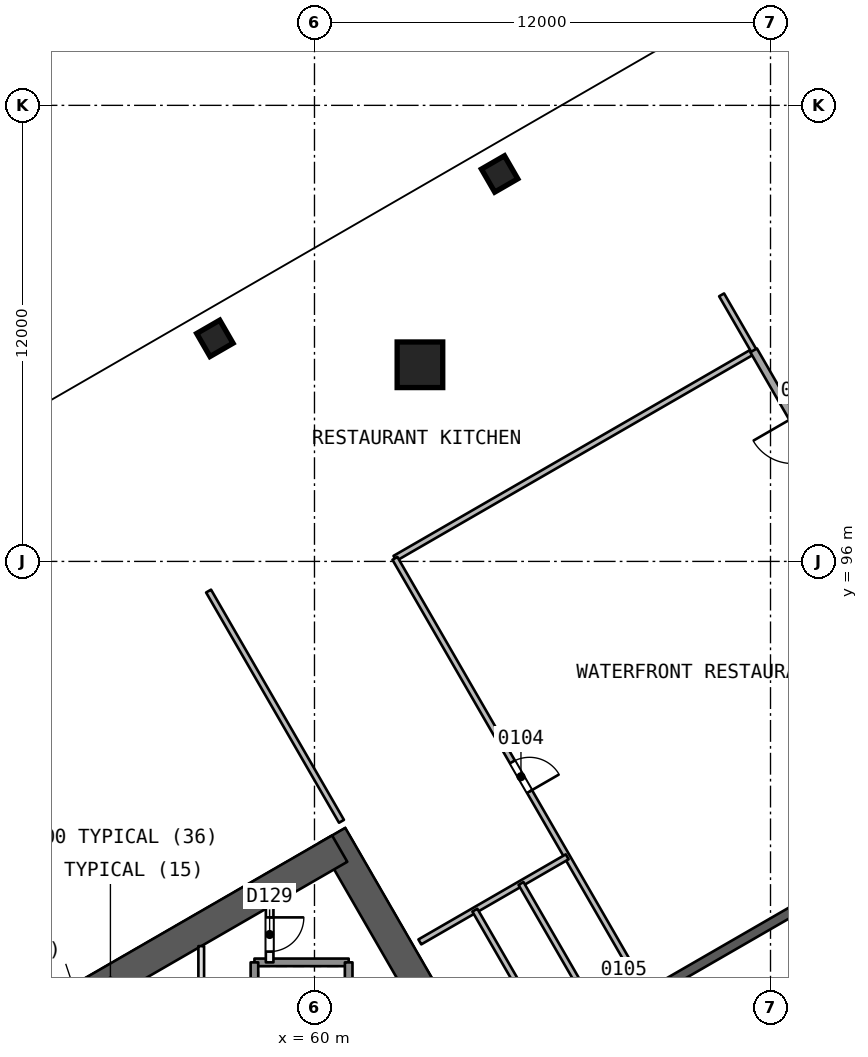
"""IFC4 building model, lengths in metres.
Left out: names, types, materials, properties, quantities, classifications, styles, units other than length and angle.
Written with IfcOpenShell. Run it as: python <this file> out.ifc"""

import sys

from ifc_helpers import new_model, si_unit, direction, frame, frame_2d, origin, origin_2d, place, context, subcontext, project, spatial, rectangle, extrude, element, fill, save


model = new_model("IFC4")
c1 = context("Model", 3, precision=1e-05, world=origin(), true_north=direction((0.0, 1.0)))
c2 = subcontext(c1, "Body", "Model", "MODEL_VIEW")
j1 = project(units=[si_unit("LENGTHUNIT", "METRE"), si_unit("PLANEANGLEUNIT", "RADIAN")], contexts=[c1])
p1 = place(None, origin())
s1 = spatial("IfcSite", under=j1, at=p1, CompositionType="ELEMENT")
p2 = place(p1, origin())
s2 = spatial("IfcBuilding", under=s1, at=p2, CompositionType="ELEMENT")
p3 = place(p2, frame((0.0, 0.0, 9.0)))
s3 = spatial("IfcBuildingStorey", under=s2, at=p3, CompositionType="ELEMENT", Elevation=9.0)
p4 = place(p3, frame((65.538, 80.0, 0.0), z_axis=(0.0, 0.0, 1.0), x_axis=(-0.49999662545, 0.866027352073, 0.0)))
e1 = element("IfcWall", 1, at=p4, inside=s3, PredefinedType="SHEAR", context=c2, shape_type="SweptSolid", body=[
    extrude(rectangle(XDim=10.149, YDim=0.8, at=frame_2d((5.074, 0.0))), origin(), (0.0, 0.0, 1.0), 6.0),
])
p5 = place(p4, frame((0.719, 0.0, 0.0)))
e2 = element("IfcOpeningElement", 2, at=p5, cuts=e1, PredefinedType="OPENING", context=c2, shape_type="SweptSolid", body=[
    extrude(rectangle(XDim=1.2, YDim=2.1, at=frame_2d((0.6, 1.05))), frame((0.0, 0.411, 0.0), z_axis=(0.0, -1.0, 0.0), x_axis=(1.0, 0.0, 0.0)), (0.0, 0.0, 1.0), 0.821),
])
p6 = place(p3, frame((60.664, 88.443, 0.0), z_axis=(0.0, 0.0, 1.0), x_axis=(-0.866029478545, -0.499992942241, 0.0)))
e3 = element("IfcWall", 3, at=p6, inside=s3, PredefinedType="SHEAR", context=c2, shape_type="SweptSolid", body=[
    extrude(rectangle(XDim=13.933, YDim=0.8, at=frame_2d((6.967, 0.0))), origin(), (0.0, 0.0, 1.0), 6.0),
])
p7 = place(p3, frame((78.2, 90.046, 0.0), z_axis=(0.0, 0.0, 1.0), x_axis=(-0.866026492143, -0.499998114903, 0.0)))
e4 = element("IfcWall", 4, at=p7, inside=s3, PredefinedType="SHEAR", context=c2, shape_type="SweptSolid", body=[
    extrude(rectangle(XDim=15.588, YDim=0.25, at=frame_2d((7.794, 0.0))), origin(), (0.0, 0.0, 1.0), 5.6),
])
p8 = place(p7, frame((4.856, 0.0, 0.0)))
e5 = element("IfcOpeningElement", 5, at=p8, cuts=e4, PredefinedType="OPENING", context=c2, shape_type="SweptSolid", body=[
    extrude(rectangle(XDim=1.2, YDim=2.4, at=frame_2d((0.6, 1.2))), frame((0.0, 0.135, 0.0), z_axis=(0.0, -1.0, 0.0), x_axis=(1.0, 0.0, 0.0)), (0.0, 0.0, 1.0), 0.271),
])
p9 = place(p7, frame((11.163, 0.0, 0.0)))
e6 = element("IfcOpeningElement", 6, at=p9, cuts=e4, PredefinedType="OPENING", context=c2, shape_type="SweptSolid", body=[
    extrude(rectangle(XDim=0.9, YDim=2.1, at=frame_2d((0.45, 1.05))), frame((0.0, 0.135, 0.0), z_axis=(0.0, -1.0, 0.0), x_axis=(1.0, 0.0, 0.0)), (0.0, 0.0, 1.0), 0.271),
])
p10 = place(p7, frame((12.566, 0.0, 0.0)))
e7 = element("IfcOpeningElement", 7, at=p10, cuts=e4, PredefinedType="OPENING", context=c2, shape_type="SweptSolid", body=[
    extrude(rectangle(XDim=0.9, YDim=2.1, at=frame_2d((0.45, 1.05))), frame((0.0, 0.135, 0.0), z_axis=(0.0, -1.0, 0.0), x_axis=(1.0, 0.0, 0.0)), (0.0, 0.0, 1.0), 0.271),
])
p11 = place(p7, frame((14.203, 0.0, 0.0)))
e8 = element("IfcOpeningElement", 8, at=p11, cuts=e4, PredefinedType="OPENING", context=c2, shape_type="SweptSolid", body=[
    extrude(rectangle(XDim=0.9, YDim=2.1, at=frame_2d((0.45, 1.05))), frame((0.0, 0.135, 0.0), z_axis=(0.0, -1.0, 0.0), x_axis=(1.0, 0.0, 0.0)), (0.0, 0.0, 1.0), 0.271),
])
p12 = place(p3, frame((62.763, 101.195, 0.0), z_axis=(0.010089088034, -0.017493176833, 0.999796078742), x_axis=(-0.499503863696, 0.866076260626, 0.020194081635)))
e9 = element("IfcColumn", 9, at=p12, inside=s3, PredefinedType="COLUMN", context=c2, shape_type="SweptSolid", body=[
    extrude(rectangle(XDim=1.2, YDim=1.2, at=origin_2d()), origin(), (0.0, 0.0, 1.0), 6.001),
])
for number, where, z_axis, x_axis in (
    (10, (64.871, 106.195, 0.0), (0.0, 0.0, 1.0), (0.866, 0.5, 0.0)),
    (11, (57.379, 101.869, 0.0), (0.0, 0.0, 1.0), (0.866, 0.5, 0.0)),
):
    element("IfcColumn", number, at=place(p3, frame(where, z_axis=z_axis, x_axis=x_axis)), inside=s3, PredefinedType="COLUMN", context=c2, shape_type="SweptSolid", body=[
        extrude(rectangle(XDim=0.7, YDim=0.7, at=origin_2d()), origin(), (0.0, 0.0, 1.0), 6.0),
    ])
p13 = place(p3, frame((71.566, 101.536, 0.0), z_axis=(0.0, 0.0, 1.0), x_axis=(-0.866017530991, -0.50001363583, 0.0)))
e12 = element("IfcWall", 12, at=p13, inside=s3, PredefinedType="PARTITIONING", context=c2, shape_type="SweptSolid", body=[
    extrude(rectangle(XDim=10.911, YDim=0.15, at=frame_2d((5.456, 0.0))), origin(), (0.0, 0.0, 1.0), 5.6),
])
p14 = place(p3, frame((62.117, 96.081, 0.0), z_axis=(0.0, 0.0, 1.0), x_axis=(0.49992899291, -0.866066395866, 0.0)))
e13 = element("IfcWall", 13, at=p14, inside=s3, PredefinedType="PARTITIONING", context=c2, shape_type="SweptSolid", body=[
    extrude(rectangle(XDim=13.268, YDim=0.15, at=frame_2d((6.634, 0.0))), origin(), (0.0, 0.0, 1.0), 5.6),
])
p15 = place(p14, frame((6.184, 0.0, 0.0)))
e14 = element("IfcOpeningElement", 14, at=p15, cuts=e13, PredefinedType="OPENING", context=c2, shape_type="SweptSolid", body=[
    extrude(rectangle(XDim=0.9, YDim=2.1, at=frame_2d((0.45, 1.05))), frame((0.0, 0.085, 0.0), z_axis=(0.0, -1.0, 0.0), x_axis=(1.0, 0.0, 0.0)), (0.0, 0.0, 1.0), 0.171),
])
p16 = place(p3, frame((74.21, 96.956, 0.0), z_axis=(0.0, 0.0, 1.0), x_axis=(-0.499991804824, 0.86603013522, 0.0)))
e15 = element("IfcWall", 15, at=p16, inside=s3, PredefinedType="PARTITIONING", context=c2, shape_type="SweptSolid", body=[
    extrude(rectangle(XDim=5.309, YDim=0.2, at=frame_2d((2.655, 0.0))), origin(), (0.0, 0.0, 1.0), 5.6),
])
p17 = place(p16, frame((2.055, 0.0, 0.0)))
e16 = element("IfcOpeningElement", 16, at=p17, cuts=e15, PredefinedType="OPENING", context=c2, shape_type="SweptSolid", body=[
    extrude(rectangle(XDim=1.2, YDim=2.4, at=frame_2d((0.6, 1.2))), frame((0.0, 0.11, 0.0), z_axis=(0.0, -1.0, 0.0), x_axis=(1.0, 0.0, 0.0)), (0.0, 0.0, 1.0), 0.221),
])
p18 = place(p3, frame((62.772, 85.989, 0.0), z_axis=(0.0, 0.0, 1.0), x_axis=(0.866013054227, 0.500021389451, 0.0)))
e17 = element("IfcWall", 17, at=p18, inside=s3, PredefinedType="PARTITIONING", context=c2, shape_type="SweptSolid", body=[
    extrude(rectangle(XDim=4.477, YDim=0.15, at=frame_2d((2.239, 0.0))), origin(), (0.0, 0.0, 1.0), 5.6),
])
p19 = place(p3, frame((57.213, 95.219, 0.0), z_axis=(0.0, 0.0, 1.0), x_axis=(0.499979261727, -0.866037376701, 0.0)))
e18 = element("IfcWall", 18, at=p19, inside=s3, PredefinedType="PARTITIONING", context=c2, shape_type="SweptSolid", body=[
    extrude(rectangle(XDim=6.995, YDim=0.15, at=frame_2d((3.498, 0.0))), origin(), (0.0, 0.0, 1.0), 5.6),
])
p20 = place(p3, frame((71.576, 101.519, 0.0), z_axis=(0.0, 0.0, 1.0), x_axis=(-0.499942880228, 0.866058379388, 0.0)))
e19 = element("IfcWall", 19, at=p20, inside=s3, PredefinedType="PARTITIONING", context=c2, shape_type="SweptSolid", body=[
    extrude(rectangle(XDim=1.726, YDim=0.15, at=frame_2d((0.863, 0.0))), origin(), (0.0, 0.0, 1.0), 5.6),
])
for number, where, z_axis, x_axis in (
    (20, (65.435, 87.526, 0.0), (0.0, 0.0, 1.0), (0.5, -0.866, 0.0)),
    (21, (64.22, 86.824, 0.0), (0.0, 0.0, 1.0), (0.5, -0.866, 0.0)),
):
    element("IfcWall", number, at=place(p3, frame(where, z_axis=z_axis, x_axis=x_axis)), inside=s3, PredefinedType="PARTITIONING", context=c2, shape_type="SweptSolid", body=[
        extrude(rectangle(XDim=4.2, YDim=0.15, at=frame_2d((2.1, 0.0))), origin(), (0.0, 0.0, 1.0), 5.6),
    ])
p21 = place(p3, frame((60.9, 85.45, 0.0), z_axis=(0.0, 0.0, 1.0), x_axis=(-1.0, 0.0, 0.0)))
e22 = element("IfcWall", 22, at=p21, inside=s3, PredefinedType="SOLIDWALL", context=c2, shape_type="SweptSolid", body=[
    extrude(rectangle(XDim=2.48, YDim=0.2, at=frame_2d((1.24, 0.0))), origin(), (0.0, 0.0, 1.0), 5.6),
])
p22 = place(p3, frame((60.9, 85.45, 0.0), z_axis=(0.0, 0.0, 1.0), x_axis=(0.0, -1.0, 0.0)))
e23 = element("IfcWall", 23, at=p22, inside=s3, PredefinedType="SOLIDWALL", context=c2, shape_type="SweptSolid", body=[
    extrude(rectangle(XDim=10.9, YDim=0.2, at=frame_2d((5.45, 0.0))), origin(), (0.0, 0.0, 1.0), 5.6),
])
p23 = place(p3, frame((58.82, 86.917, 0.0), z_axis=(0.0, 0.0, 1.0), x_axis=(0.0, -1.0, 0.0)))
e24 = element("IfcWall", 24, at=p23, inside=s3, PredefinedType="PARTITIONING", context=c2, shape_type="SweptSolid", body=[
    extrude(rectangle(XDim=1.467, YDim=0.2, at=frame_2d((0.733, 0.0))), origin(), (0.0, 0.0, 1.0), 5.6),
])
p24 = place(p23, frame((0.283, 0.0, 0.0)))
e25 = element("IfcOpeningElement", 25, at=p24, cuts=e24, PredefinedType="OPENING", context=c2, shape_type="SweptSolid", body=[
    extrude(rectangle(XDim=0.9, YDim=2.1, at=frame_2d((0.45, 1.05))), frame((0.0, 0.11, 0.0), z_axis=(0.0, -1.0, 0.0), x_axis=(1.0, 0.0, 0.0)), (0.0, 0.0, 1.0), 0.221),
])
p25 = place(p3, frame((58.42, 85.45, 0.0), z_axis=(0.0, 0.0, 1.0), x_axis=(0.0, -1.0, 0.0)))
e26 = element("IfcWall", 26, at=p25, inside=s3, PredefinedType="SOLIDWALL", context=c2, shape_type="SweptSolid", body=[
    extrude(rectangle(XDim=9.0, YDim=0.2, at=frame_2d((4.5, 0.0))), origin(), (0.0, 0.0, 1.0), 5.6),
])
p26 = place(p3, frame((57.02, 85.877, 0.0), z_axis=(0.0, 0.0, 1.0), x_axis=(0.0, -1.0, 0.0)))
e27 = element("IfcWall", 27, at=p26, inside=s3, PredefinedType="PARTITIONING", context=c2, shape_type="SweptSolid", body=[
    extrude(rectangle(XDim=2.377, YDim=0.15, at=frame_2d((1.189, 0.0))), origin(), (0.0, 0.0, 1.0), 5.6),
])
p27 = place(p3, frame((77.738, 86.846, 0.0), z_axis=(0.0, 0.0, 1.0), x_axis=(-0.866026658274, -0.499997827154, 0.0)))
e28 = element("IfcWall", 28, at=p27, inside=s3, PredefinedType="PARTITIONING", context=c2, shape_type="SweptSolid", body=[
    extrude(rectangle(XDim=11.588, YDim=0.1, at=frame_2d((5.794, 0.0))), origin(), (0.0, 0.0, 1.0), 5.6),
])
p28 = place(p3, frame((56.672, 106.946, 0.0), z_axis=(0.0, 0.0, 1.0), x_axis=(-0.866025403784, -0.5, 0.0)))
e29 = element("IfcColumn", 29, at=p28, inside=s3, PredefinedType="COLUMN", context=c2, shape_type="SweptSolid", body=[
    extrude(rectangle(XDim=1.0, YDim=1.0, at=origin_2d()), origin(), (0.0, 0.0, 1.0), 4.7),
])
p29 = place(p15, origin())
e30 = element("IfcDoor", 30, at=p29, inside=s3, OperationType="SINGLE_SWING_RIGHT", PredefinedType="NOTDEFINED", context=c2, shape_type="SweptSolid", body=[
    extrude(rectangle(XDim=0.9, YDim=2.1, at=frame_2d((0.45, 1.05))), frame((0.0, 0.025, 0.0), z_axis=(0.0, -1.0, 0.0), x_axis=(1.0, 0.0, 0.0)), (0.0, 0.0, 1.0), 0.05),
])
fill(e14, e30)
p30 = place(p24, origin())
e31 = element("IfcDoor", 31, at=p30, inside=s3, OperationType="SINGLE_SWING_LEFT", PredefinedType="NOTDEFINED", context=c2, shape_type="SweptSolid", body=[
    extrude(rectangle(XDim=0.9, YDim=2.1, at=frame_2d((0.45, 1.05))), frame((0.0, 0.025, 0.0), z_axis=(0.0, -1.0, 0.0), x_axis=(1.0, 0.0, 0.0)), (0.0, 0.0, 1.0), 0.05),
])
fill(e25, e31)
save(model, sys.argv[1])
